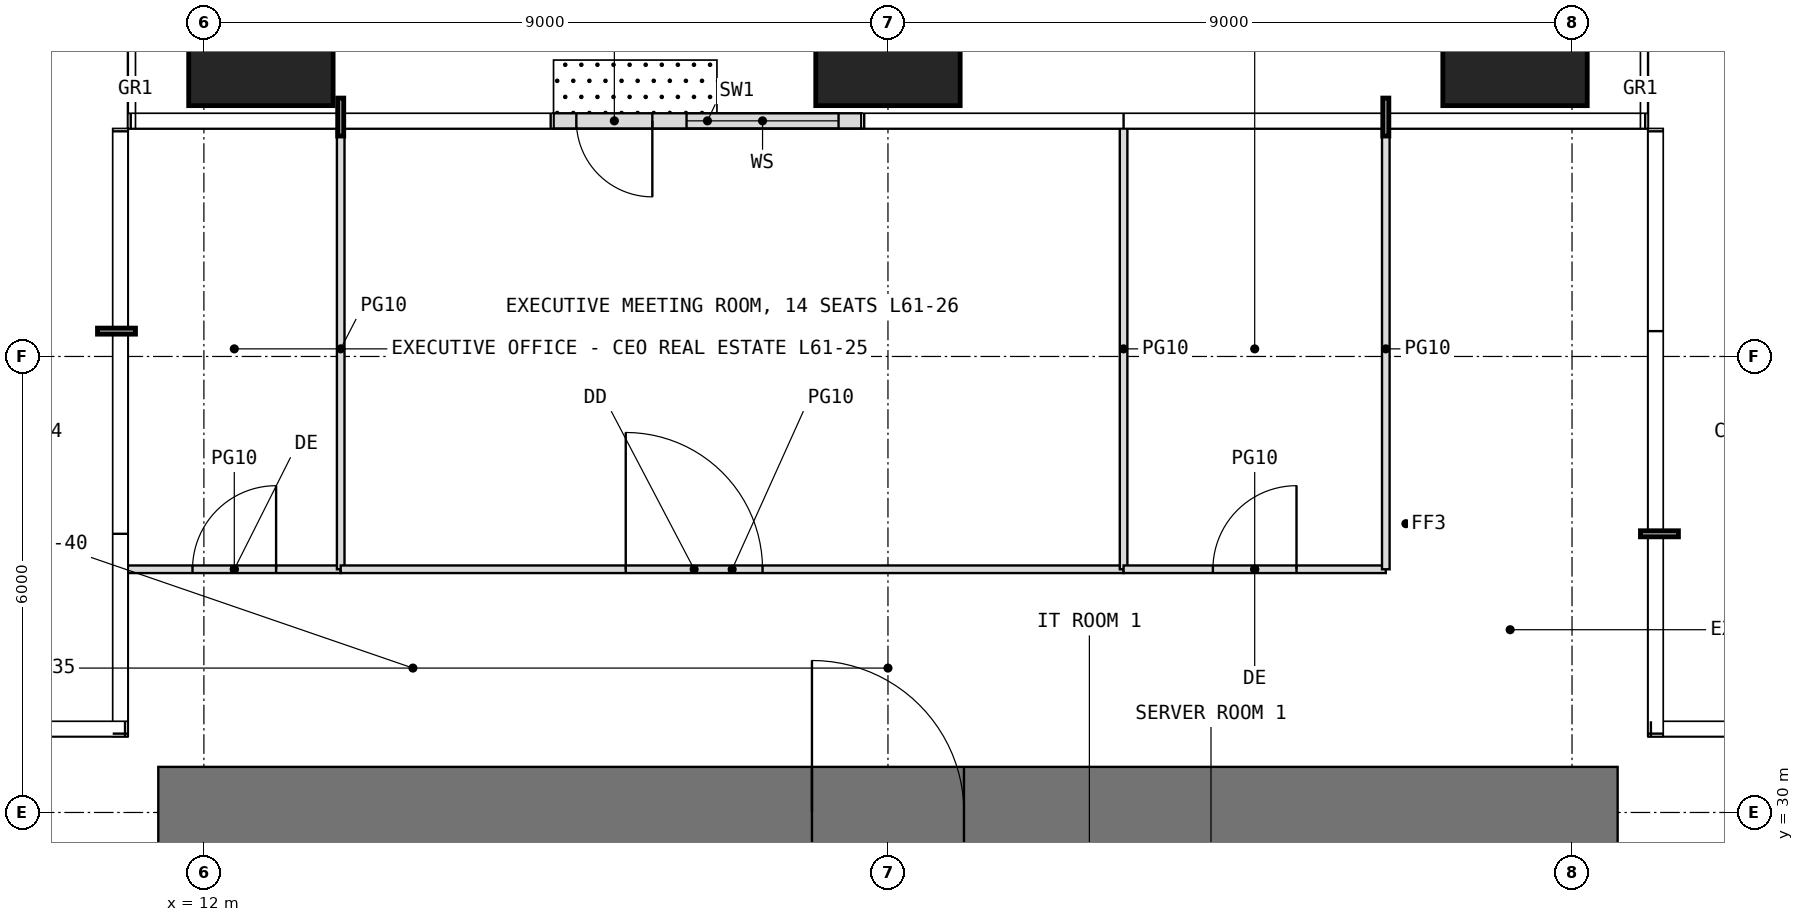
"""IFC4 building model, lengths in metres.
Left out: names, types, materials, properties, quantities, classifications, styles, units other than length and angle.
Written with IfcOpenShell. Run it as: python <this file> out.ifc"""

import sys

from ifc_helpers import new_model, si_unit, direction, frame, frame_2d, origin, origin_2d, place, context, subcontext, project, spatial, rectangle, extrude, element, fill, save


model = new_model("IFC4")
c1 = context("Model", 3, precision=1e-05, world=origin(), true_north=direction((0.0, 1.0)))
c2 = subcontext(c1, "Body", "Model", "MODEL_VIEW")
j1 = project(units=[si_unit("LENGTHUNIT", "METRE"), si_unit("PLANEANGLEUNIT", "RADIAN")], contexts=[c1])
p1 = place(None, origin())
s1 = spatial("IfcSite", under=j1, at=p1, CompositionType="ELEMENT")
p2 = place(p1, origin())
s2 = spatial("IfcBuilding", under=s1, at=p2, CompositionType="ELEMENT")
p3 = place(p2, frame((0.0, 0.0, 256.6)))
s3 = spatial("IfcBuildingStorey", under=s2, at=p3, CompositionType="ELEMENT", Elevation=256.6)
for number, where, z_axis, x_axis in (
    (1, (12.75, 40.25, 0.0), (0.0, 0.0, 1.0), (1.0, 0.0, 0.0)),
    (2, (21.0, 40.25, 0.0), (0.0, 0.0, 1.0), (1.0, 0.0, 0.0)),
    (3, (29.25, 40.25, 0.0), (0.0, 0.0, 1.0), (1.0, 0.0, 0.0)),
):
    element("IfcColumn", number, at=place(p3, frame(where, z_axis=z_axis, x_axis=x_axis)), inside=s3, PredefinedType="COLUMN", context=c2, shape_type="SweptSolid", body=[
        extrude(rectangle(XDim=1.9, YDim=1.9, at=origin_2d()), origin(), (0.0, 0.0, 1.0), 4.2),
    ])
p4 = place(p3, frame((20.65, 39.1, 0.0), z_axis=(0.0, 0.0, 1.0), x_axis=(-1.0, 0.0, 0.0)))
e4 = element("IfcWall", 4, at=p4, inside=s3, PredefinedType="USERDEFINED", context=c2, shape_type="SweptSolid", body=[
    extrude(rectangle(XDim=4.05, YDim=0.2, at=frame_2d((2.025, 0.0))), origin(), (0.0, 0.0, 1.0), 3.95),
])
p5 = place(p4, frame((2.75, 0.0, 0.0)))
e5 = element("IfcOpeningElement", 5, at=p5, cuts=e4, PredefinedType="OPENING", context=c2, shape_type="SweptSolid", body=[
    extrude(rectangle(XDim=1.0, YDim=2.4, at=frame_2d((0.5, 1.2))), frame((0.0, 0.11, 0.0), z_axis=(0.0, -1.0, 0.0), x_axis=(1.0, 0.0, 0.0)), (0.0, 0.0, 1.0), 0.22),
])
p6 = place(p4, frame((0.3, 0.0, 0.3)))
e6 = element("IfcOpeningElement", 6, at=p6, cuts=e4, PredefinedType="OPENING", context=c2, shape_type="SweptSolid", body=[
    extrude(rectangle(XDim=2.0, YDim=2.7, at=frame_2d((1.0, 1.35))), frame((0.0, 0.11, 0.0), z_axis=(0.0, -1.0, 0.0), x_axis=(1.0, 0.0, 0.0)), (0.0, 0.0, 1.0), 0.22),
])
p7 = place(p3, frame((11.4, 30.0, -0.05), z_axis=(0.0, 0.0, 1.0), x_axis=(1.0, 0.0, 0.0)))
e7 = element("IfcWall", 7, at=p7, inside=s3, PredefinedType="SHEAR", context=c2, shape_type="SweptSolid", body=[
    extrude(rectangle(XDim=19.2, YDim=1.2, at=frame_2d((9.6, 0.0))), origin(), (0.0, 0.0, 1.0), 4.2),
])
p8 = place(p7, frame((8.6, 0.0, 0.05)))
e8 = element("IfcOpeningElement", 8, at=p8, cuts=e7, PredefinedType="OPENING", context=c2, shape_type="SweptSolid", body=[
    extrude(rectangle(XDim=2.0, YDim=2.2, at=frame_2d((1.0, 1.1))), frame((0.0, 0.61, 0.0), z_axis=(0.0, -1.0, 0.0), x_axis=(1.0, 0.0, 0.0)), (0.0, 0.0, 1.0), 1.22),
])
p9 = place(p3, frame((11.0, 33.2, 0.0), z_axis=(0.0, 0.0, 1.0), x_axis=(1.0, 0.0, 0.0)))
e9 = element("IfcWall", 9, at=p9, inside=s3, PredefinedType="PARTITIONING", context=c2, shape_type="SweptSolid", body=[
    extrude(rectangle(XDim=2.8, YDim=0.1, at=frame_2d((1.4, 0.0))), origin(), (0.0, 0.0, 1.0), 3.95),
])
p10 = place(p9, frame((0.85, 0.0, 0.0)))
e10 = element("IfcOpeningElement", 10, at=p10, cuts=e9, PredefinedType="OPENING", context=c2, shape_type="SweptSolid", body=[
    extrude(rectangle(XDim=1.1, YDim=2.3, at=frame_2d((0.55, 1.15))), frame((0.0, 0.06, 0.0), z_axis=(0.0, -1.0, 0.0), x_axis=(1.0, 0.0, 0.0)), (0.0, 0.0, 1.0), 0.12),
])
p11 = place(p3, frame((13.8, 33.2, 0.0), z_axis=(0.0, 0.0, 1.0), x_axis=(0.0, 1.0, 0.0)))
e11 = element("IfcWall", 11, at=p11, inside=s3, PredefinedType="PARTITIONING", context=c2, shape_type="SweptSolid", body=[
    extrude(rectangle(XDim=5.8, YDim=0.1, at=frame_2d((2.9, 0.0))), origin(), (0.0, 0.0, 1.0), 3.95),
])
p12 = place(p3, frame((13.8, 33.2, 0.0), z_axis=(0.0, 0.0, 1.0), x_axis=(1.0, 0.0, 0.0)))
e12 = element("IfcWall", 12, at=p12, inside=s3, PredefinedType="PARTITIONING", context=c2, shape_type="SweptSolid", body=[
    extrude(rectangle(XDim=10.3, YDim=0.1, at=frame_2d((5.15, 0.0))), origin(), (0.0, 0.0, 1.0), 3.95),
])
p13 = place(p12, frame((3.75, 0.0, 0.0)))
e13 = element("IfcOpeningElement", 13, at=p13, cuts=e12, PredefinedType="OPENING", context=c2, shape_type="SweptSolid", body=[
    extrude(rectangle(XDim=1.8, YDim=2.4, at=frame_2d((0.9, 1.2))), frame((0.0, 0.06, 0.0), z_axis=(0.0, -1.0, 0.0), x_axis=(1.0, 0.0, 0.0)), (0.0, 0.0, 1.0), 0.12),
])
p14 = place(p3, frame((24.1, 33.2, 0.0), z_axis=(0.0, 0.0, 1.0), x_axis=(0.0, 1.0, 0.0)))
e14 = element("IfcWall", 14, at=p14, inside=s3, PredefinedType="PARTITIONING", context=c2, shape_type="SweptSolid", body=[
    extrude(rectangle(XDim=5.8, YDim=0.1, at=frame_2d((2.9, 0.0))), origin(), (0.0, 0.0, 1.0), 3.95),
])
p15 = place(p3, frame((24.1, 33.2, 0.0), z_axis=(0.0, 0.0, 1.0), x_axis=(1.0, 0.0, 0.0)))
e15 = element("IfcWall", 15, at=p15, inside=s3, PredefinedType="PARTITIONING", context=c2, shape_type="SweptSolid", body=[
    extrude(rectangle(XDim=3.45, YDim=0.1, at=frame_2d((1.725, 0.0))), origin(), (0.0, 0.0, 1.0), 3.95),
])
p16 = place(p15, frame((1.175, 0.0, 0.0)))
e16 = element("IfcOpeningElement", 16, at=p16, cuts=e15, PredefinedType="OPENING", context=c2, shape_type="SweptSolid", body=[
    extrude(rectangle(XDim=1.1, YDim=2.3, at=frame_2d((0.55, 1.15))), frame((0.0, 0.06, 0.0), z_axis=(0.0, -1.0, 0.0), x_axis=(1.0, 0.0, 0.0)), (0.0, 0.0, 1.0), 0.12),
])
p17 = place(p3, frame((27.55, 33.2, 0.0), z_axis=(0.0, 0.0, 1.0), x_axis=(0.0, 1.0, 0.0)))
e17 = element("IfcWall", 17, at=p17, inside=s3, PredefinedType="PARTITIONING", context=c2, shape_type="SweptSolid", body=[
    extrude(rectangle(XDim=5.8, YDim=0.1, at=frame_2d((2.9, 0.0))), origin(), (0.0, 0.0, 1.0), 3.95),
])
p18 = place(p5, origin())
e18 = element("IfcDoor", 18, at=p18, inside=s3, OperationType="SINGLE_SWING_LEFT", PredefinedType="DOOR", context=c2, shape_type="SweptSolid", body=[
    extrude(rectangle(XDim=1.0, YDim=2.4, at=frame_2d((0.5, 1.2))), frame((0.0, 0.025, 0.0), z_axis=(0.0, -1.0, 0.0), x_axis=(1.0, 0.0, 0.0)), (0.0, 0.0, 1.0), 0.05),
])
fill(e5, e18)
p19 = place(p6, origin())
e19 = element("IfcWindow", 19, at=p19, inside=s3, PartitioningType="SINGLE_PANEL", PredefinedType="WINDOW", context=c2, shape_type="SweptSolid", body=[
    extrude(rectangle(XDim=2.0, YDim=2.7, at=frame_2d((1.0, 1.35))), frame((0.0, 0.03, 0.0), z_axis=(0.0, -1.0, 0.0), x_axis=(1.0, 0.0, 0.0)), (0.0, 0.0, 1.0), 0.06),
])
fill(e6, e19)
p20 = place(p8, origin())
e20 = element("IfcDoor", 20, at=p20, inside=s3, OperationType="DOUBLE_DOOR_SINGLE_SWING", PredefinedType="DOOR", context=c2, shape_type="SweptSolid", body=[
    extrude(rectangle(XDim=2.0, YDim=2.2, at=frame_2d((1.0, 1.1))), frame((0.0, 0.025, 0.0), z_axis=(0.0, -1.0, 0.0), x_axis=(1.0, 0.0, 0.0)), (0.0, 0.0, 1.0), 0.05),
])
fill(e8, e20)
p21 = place(p10, origin())
e21 = element("IfcDoor", 21, at=p21, inside=s3, OperationType="SINGLE_SWING_RIGHT", PredefinedType="DOOR", context=c2, shape_type="SweptSolid", body=[
    extrude(rectangle(XDim=1.1, YDim=2.3, at=frame_2d((0.55, 1.15))), frame((0.0, 0.025, 0.0), z_axis=(0.0, -1.0, 0.0), x_axis=(1.0, 0.0, 0.0)), (0.0, 0.0, 1.0), 0.05),
])
fill(e10, e21)
p22 = place(p13, origin())
e22 = element("IfcDoor", 22, at=p22, inside=s3, OperationType="DOUBLE_DOOR_SINGLE_SWING", PredefinedType="DOOR", context=c2, shape_type="SweptSolid", body=[
    extrude(rectangle(XDim=1.8, YDim=2.4, at=frame_2d((0.9, 1.2))), frame((0.0, 0.025, 0.0), z_axis=(0.0, -1.0, 0.0), x_axis=(1.0, 0.0, 0.0)), (0.0, 0.0, 1.0), 0.05),
])
fill(e13, e22)
p23 = place(p16, origin())
e23 = element("IfcDoor", 23, at=p23, inside=s3, OperationType="SINGLE_SWING_RIGHT", PredefinedType="DOOR", context=c2, shape_type="SweptSolid", body=[
    extrude(rectangle(XDim=1.1, YDim=2.3, at=frame_2d((0.55, 1.15))), frame((0.0, 0.025, 0.0), z_axis=(0.0, -1.0, 0.0), x_axis=(1.0, 0.0, 0.0)), (0.0, 0.0, 1.0), 0.05),
])
fill(e16, e23)
save(model, sys.argv[1])
